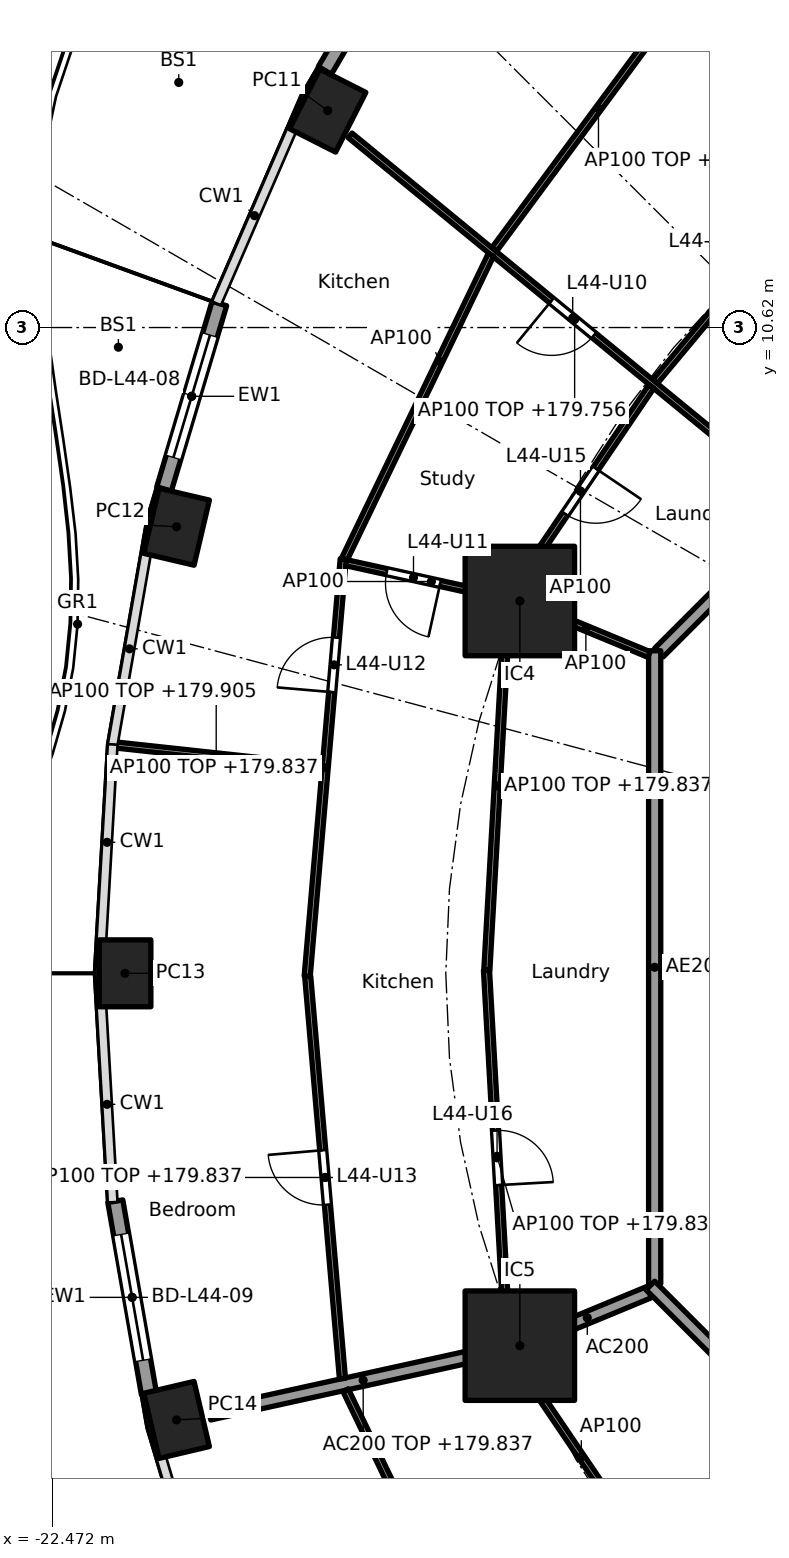
"""IFC4 building model, lengths in metres.
Left out: names, types, materials, properties, quantities, classifications, styles, units other than length and angle.
Written with IfcOpenShell. Run it as: python <this file> out.ifc"""

import sys

from ifc_helpers import new_model, si_unit, direction, frame, frame_2d, origin, origin_2d, place, context, subcontext, project, spatial, rectangle, hollow_rectangle, extrude, element, fill, save


model = new_model("IFC4")
c1 = context("Model", 3, precision=1e-05, world=origin(), true_north=direction((0.0, 1.0)))
c2 = subcontext(c1, "Body", "Model", "MODEL_VIEW")
j1 = project(units=[si_unit("LENGTHUNIT", "METRE"), si_unit("PLANEANGLEUNIT", "RADIAN")], contexts=[c1])
p1 = place(None, origin())
s1 = spatial("IfcSite", under=j1, at=p1, CompositionType="ELEMENT")
p2 = place(p1, origin())
s2 = spatial("IfcBuilding", under=s1, at=p2, CompositionType="ELEMENT")
p3 = place(p2, frame((0.0, 0.0, 177.0)))
s3 = spatial("IfcBuildingStorey", under=s2, at=p3, CompositionType="ELEMENT", Elevation=177.0)
for number, where, z_axis, x_axis in (
    (1, (-17.942, 14.188, 0.0), (0.0, 0.0, 1.0), (-0.452, -0.892, 0.0)),
    (2, (-20.427, 7.344, 0.0), (0.0, 0.0, 1.0), (-0.229, -0.973, 0.0)),
    (3, (-21.275, 0.0, 0.0), (0.0, 0.0, 1.0), (0.0, -1.0, 0.0)),
    (4, (-20.427, -7.344, 0.0), (0.0, 0.0, 1.0), (0.229, -0.973, 0.0)),
):
    element("IfcColumn", number, at=place(p3, frame(where, z_axis=z_axis, x_axis=x_axis)), inside=s3, PredefinedType="COLUMN", context=c2, shape_type="SweptSolid", body=[
        extrude(hollow_rectangle(XDim=1.1, YDim=0.85, WallThickness=0.036, at=origin_2d()), origin(), (0.0, 0.0, 1.0), 3.7),
    ])
for number, where, z_axis, x_axis in (
    (5, (-14.782, 6.123, 0.0), (0.0, 0.0, 1.0), (1.0, 0.0, 0.0)),
    (6, (-14.782, -6.123, 0.0), (0.0, 0.0, 1.0), (1.0, 0.0, 0.0)),
):
    element("IfcColumn", number, at=place(p3, frame(where, z_axis=z_axis, x_axis=x_axis)), inside=s3, PredefinedType="COLUMN", context=c2, shape_type="SweptSolid", body=[
        extrude(rectangle(XDim=1.8, YDim=1.8, at=origin_2d()), origin(), (0.0, 0.0, 1.0), 3.7),
    ])
p4 = place(p3, frame((-17.989, 14.848, 0.0), z_axis=(0.0, 0.0, 1.0), x_axis=(0.506309086483, 0.862352079458, 0.0)))
e7 = element("IfcWall", 7, at=p4, inside=s3, PredefinedType="SOLIDWALL", context=c2, shape_type="SweptSolid", body=[
    extrude(rectangle(XDim=3.092, YDim=0.25, at=frame_2d((1.546, 0.0))), origin(), (0.0, 0.0, 1.0), 3.44),
])
p5 = place(p4, frame((0.496, 0.0, 0.0)))
e8 = element("IfcOpeningElement", 8, at=p5, cuts=e7, PredefinedType="OPENING", context=c2, shape_type="SweptSolid", body=[
    extrude(rectangle(XDim=2.1, YDim=2.4, at=frame_2d((1.05, 1.2))), frame((0.0, 0.135, 0.0), z_axis=(0.0, -1.0, 0.0), x_axis=(1.0, 0.0, 0.0)), (0.0, 0.0, 1.0), 0.27),
])
p6 = place(p3, frame((-20.633, 7.965, 0.0), z_axis=(0.0, 0.0, 1.0), x_axis=(0.28584838049, 0.958274857946, 0.0)))
e9 = element("IfcWall", 9, at=p6, inside=s3, PredefinedType="SOLIDWALL", context=c2, shape_type="SweptSolid", body=[
    extrude(rectangle(XDim=3.182, YDim=0.25, at=frame_2d((1.591, 0.0))), origin(), (0.0, 0.0, 1.0), 3.44),
])
p7 = place(p6, frame((0.541, 0.0, 0.0)))
e10 = element("IfcOpeningElement", 10, at=p7, cuts=e9, PredefinedType="OPENING", context=c2, shape_type="SweptSolid", body=[
    extrude(rectangle(XDim=2.1, YDim=2.4, at=frame_2d((1.05, 1.2))), frame((0.0, 0.135, 0.0), z_axis=(0.0, -1.0, 0.0), x_axis=(1.0, 0.0, 0.0)), (0.0, 0.0, 1.0), 0.27),
])
p8 = place(p3, frame((-20.882, -6.91, 0.0), z_axis=(0.0, 0.0, 1.0), x_axis=(-0.172223552479, 0.98505789067, 0.0)))
e11 = element("IfcWall", 11, at=p8, inside=s3, PredefinedType="SOLIDWALL", context=c2, shape_type="SweptSolid", body=[
    extrude(rectangle(XDim=3.211, YDim=0.25, at=frame_2d((1.605, 0.0))), origin(), (0.0, 0.0, 1.0), 3.44),
])
p9 = place(p8, frame((0.555, 0.0, 0.0)))
e12 = element("IfcOpeningElement", 12, at=p9, cuts=e11, PredefinedType="OPENING", context=c2, shape_type="SweptSolid", body=[
    extrude(rectangle(XDim=2.1, YDim=2.4, at=frame_2d((1.05, 1.2))), frame((0.0, 0.135, 0.0), z_axis=(0.0, -1.0, 0.0), x_axis=(1.0, 0.0, 0.0)), (0.0, 0.0, 1.0), 0.27),
])
p10 = place(p3, frame((-12.657, -5.243, 0.0), z_axis=(0.0, 0.0, 1.0), x_axis=(-0.923859888513, -0.38273085373, 0.0)))
e13 = element("IfcWall", 13, at=p10, inside=s3, PredefinedType="PARTITIONING", context=c2, shape_type="SweptSolid", body=[
    extrude(rectangle(XDim=2.199, YDim=0.2, at=frame_2d((1.1, 0.0))), origin(), (0.0, 0.0, 1.0), 3.44),
])
p11 = place(p3, frame((-14.831, -6.134, 0.0), z_axis=(0.0, 0.0, 1.0), x_axis=(-0.976568396888, -0.215207263354, 0.0)))
e14 = element("IfcWall", 14, at=p11, inside=s3, PredefinedType="PARTITIONING", context=c2, shape_type="SweptSolid", body=[
    extrude(rectangle(XDim=5.177, YDim=0.2, at=frame_2d((2.588, 0.0))), origin(), (0.0, 0.0, 1.0), 2.837),
])
p12 = place(p3, frame((-5.275, 12.494, 0.0), z_axis=(0.0, 0.0, 1.0), x_axis=(-0.707106781187, -0.707106781187, 0.0)))
e15 = element("IfcWall", 15, at=p12, inside=s3, PredefinedType="PARTITIONING", context=c2, shape_type="SweptSolid", body=[
    extrude(rectangle(XDim=10.209, YDim=0.2, at=frame_2d((5.104, 0.0))), origin(), (0.0, 0.0, 1.0), 3.44),
])
p13 = place(p3, frame((-12.565, 5.304, 0.0), z_axis=(0.0, 0.0, 1.0), x_axis=(0.0, -1.0, 0.0)))
e16 = element("IfcWall", 16, at=p13, inside=s3, PredefinedType="PARTITIONING", context=c2, shape_type="SweptSolid", body=[
    extrude(rectangle(XDim=10.409, YDim=0.2, at=frame_2d((5.205, 0.0))), origin(), (0.0, 0.0, 1.0), 3.44),
])
p14 = place(p3, frame((-12.635, -5.134, 0.0), z_axis=(0.0, 0.0, 1.0), x_axis=(0.707106781187, -0.707106781187, 0.0)))
e17 = element("IfcWall", 17, at=p14, inside=s3, PredefinedType="PARTITIONING", context=c2, shape_type="SweptSolid", body=[
    extrude(rectangle(XDim=10.609, YDim=0.2, at=frame_2d((5.305, 0.0))), origin(), (0.0, 0.0, 1.0), 3.44),
])
p15 = place(p3, frame((-9.631, 13.242, 0.0), z_axis=(0.0, 0.0, 1.0), x_axis=(-0.640315711982, -0.768111833647, 0.0)))
e18 = element("IfcWall", 18, at=p15, inside=s3, PredefinedType="PARTITIONING", context=c2, shape_type="SweptSolid", body=[
    extrude(rectangle(XDim=4.572, YDim=0.1, at=frame_2d((2.286, 0.0))), origin(), (0.0, 0.0, 1.0), 2.837),
])
p16 = place(p15, frame((1.861, 0.0, 0.0)))
e19 = element("IfcOpeningElement", 19, at=p16, cuts=e18, PredefinedType="OPENING", context=c2, shape_type="SweptSolid", body=[
    extrude(rectangle(XDim=0.9, YDim=2.1, at=frame_2d((0.45, 1.05))), frame((0.0, 0.06, 0.0), z_axis=(0.0, -1.0, 0.0), x_axis=(1.0, 0.0, 0.0)), (0.0, 0.0, 1.0), 0.12),
])
p17 = place(p3, frame((-11.773, 16.542, 0.0), z_axis=(0.0, 0.0, 1.0), x_axis=(-0.594694305999, -0.803951915485, 0.0)))
e20 = element("IfcWall", 20, at=p17, inside=s3, PredefinedType="PARTITIONING", context=c2, shape_type="SweptSolid", body=[
    extrude(rectangle(XDim=5.772, YDim=0.1, at=frame_2d((2.886, 0.0))), origin(), (0.0, 0.0, 1.0), 2.837),
])
p18 = place(p3, frame((-10.189, 7.721, 0.0), z_axis=(0.0, 0.0, 1.0), x_axis=(-0.773134429339, 0.634242188892, 0.0)))
e21 = element("IfcWall", 21, at=p18, inside=s3, PredefinedType="PARTITIONING", context=c2, shape_type="SweptSolid", body=[
    extrude(rectangle(XDim=9.552, YDim=0.1, at=frame_2d((4.776, 0.0))), origin(), (0.0, 0.0, 1.0), 2.756),
])
p19 = place(p18, frame((4.367, 0.0, 0.0)))
e22 = element("IfcOpeningElement", 22, at=p19, cuts=e21, PredefinedType="OPENING", context=c2, shape_type="SweptSolid", body=[
    extrude(rectangle(XDim=0.9, YDim=2.1, at=frame_2d((0.45, 1.05))), frame((0.0, 0.06, 0.0), z_axis=(0.0, -1.0, 0.0), x_axis=(1.0, 0.0, 0.0)), (0.0, 0.0, 1.0), 0.12),
])
p20 = place(p3, frame((-12.619, 9.65, 0.0), z_axis=(0.0, 0.0, 1.0), x_axis=(-0.561064907171, -0.827771810308, 0.0)))
e23 = element("IfcWall", 23, at=p20, inside=s3, PredefinedType="PARTITIONING", context=c2, shape_type="SweptSolid", body=[
    extrude(rectangle(XDim=4.159, YDim=0.1, at=frame_2d((2.079, 0.0))), origin(), (0.0, 0.0, 1.0), 3.44),
])
p21 = place(p20, frame((1.629, 0.0, 0.0)))
e24 = element("IfcOpeningElement", 24, at=p21, cuts=e23, PredefinedType="OPENING", context=c2, shape_type="SweptSolid", body=[
    extrude(rectangle(XDim=0.9, YDim=2.1, at=frame_2d((0.45, 1.05))), frame((0.0, 0.06, 0.0), z_axis=(0.0, -1.0, 0.0), x_axis=(1.0, 0.0, 0.0)), (0.0, 0.0, 1.0), 0.12),
])
p22 = place(p3, frame((-15.257, 11.816, 0.0), z_axis=(0.0, 0.0, 1.0), x_axis=(-0.434040130629, -0.900893536997, 0.0)))
e25 = element("IfcWall", 25, at=p22, inside=s3, PredefinedType="PARTITIONING", context=c2, shape_type="SweptSolid", body=[
    extrude(rectangle(XDim=5.558, YDim=0.1, at=frame_2d((2.779, 0.0))), origin(), (0.0, 0.0, 1.0), 3.44),
])
p23 = place(p3, frame((-12.657, 5.243, 0.0), z_axis=(0.0, 0.0, 1.0), x_axis=(-0.923848837015, 0.382757529444, 0.0)))
e26 = element("IfcWall", 26, at=p23, inside=s3, PredefinedType="PARTITIONING", context=c2, shape_type="SweptSolid", body=[
    extrude(rectangle(XDim=2.25, YDim=0.1, at=frame_2d((1.125, 0.0))), origin(), (0.0, 0.0, 1.0), 3.44),
])
p24 = place(p3, frame((-14.831, 6.134, 0.0), z_axis=(0.0, 0.0, 1.0), x_axis=(-0.976560749847, 0.215241961191, 0.0)))
e27 = element("IfcWall", 27, at=p24, inside=s3, PredefinedType="PARTITIONING", context=c2, shape_type="SweptSolid", body=[
    extrude(rectangle(XDim=2.879, YDim=0.1, at=frame_2d((1.439, 0.0))), origin(), (0.0, 0.0, 1.0), 3.44),
])
p25 = place(p24, frame((1.291, 0.0, 0.0)))
e28 = element("IfcOpeningElement", 28, at=p25, cuts=e27, PredefinedType="OPENING", context=c2, shape_type="SweptSolid", body=[
    extrude(rectangle(XDim=0.9, YDim=2.1, at=frame_2d((0.45, 1.05))), frame((0.0, 0.06, 0.0), z_axis=(0.0, -1.0, 0.0), x_axis=(1.0, 0.0, 0.0)), (0.0, 0.0, 1.0), 0.12),
])
p26 = place(p3, frame((-14.983, 6.117, 0.0), z_axis=(0.0, 0.0, 1.0), x_axis=(-0.056328933432, -0.998412265178, 0.0)))
e29 = element("IfcWall", 29, at=p26, inside=s3, PredefinedType="PARTITIONING", context=c2, shape_type="SweptSolid", body=[
    extrude(rectangle(XDim=6.077, YDim=0.1, at=frame_2d((3.038, 0.0))), origin(), (0.0, 0.0, 1.0), 2.837),
])
p27 = place(p3, frame((-17.687, 6.814, 0.0), z_axis=(0.0, 0.0, 1.0), x_axis=(-0.086010249709, -0.996294252189, 0.0)))
e30 = element("IfcWall", 30, at=p27, inside=s3, PredefinedType="PARTITIONING", context=c2, shape_type="SweptSolid", body=[
    extrude(rectangle(XDim=6.889, YDim=0.1, at=frame_2d((3.445, 0.0))), origin(), (0.0, 0.0, 1.0), 2.837),
])
p28 = place(p27, frame((1.297, 0.0, 0.0)))
e31 = element("IfcOpeningElement", 31, at=p28, cuts=e30, PredefinedType="OPENING", context=c2, shape_type="SweptSolid", body=[
    extrude(rectangle(XDim=0.9, YDim=2.1, at=frame_2d((0.45, 1.05))), frame((0.0, 0.06, 0.0), z_axis=(0.0, -1.0, 0.0), x_axis=(1.0, 0.0, 0.0)), (0.0, 0.0, 1.0), 0.12),
])
p29 = place(p3, frame((-18.033, 3.387, 0.0), z_axis=(0.0, 0.0, 1.0), x_axis=(-0.994194772207, 0.107595329438, 0.0)))
e32 = element("IfcWall", 32, at=p29, inside=s3, PredefinedType="PARTITIONING", context=c2, shape_type="SweptSolid", body=[
    extrude(rectangle(XDim=3.506, YDim=0.1, at=frame_2d((1.753, 0.0))), origin(), (0.0, 0.0, 1.0), 2.905),
])
p30 = place(p3, frame((-15.331, 0.05, 0.0), z_axis=(0.0, 0.0, 1.0), x_axis=(0.056310939406, -0.998413280212, 0.0)))
e33 = element("IfcWall", 33, at=p30, inside=s3, PredefinedType="PARTITIONING", context=c2, shape_type="SweptSolid", body=[
    extrude(rectangle(XDim=6.126, YDim=0.1, at=frame_2d((3.063, 0.0))), origin(), (0.0, 0.0, 1.0), 2.837),
])
p31 = place(p30, frame((2.638, 0.0, 0.0)))
e34 = element("IfcOpeningElement", 34, at=p31, cuts=e33, PredefinedType="OPENING", context=c2, shape_type="SweptSolid", body=[
    extrude(rectangle(XDim=0.9, YDim=2.1, at=frame_2d((0.45, 1.05))), frame((0.0, 0.06, 0.0), z_axis=(0.0, -1.0, 0.0), x_axis=(1.0, 0.0, 0.0)), (0.0, 0.0, 1.0), 0.12),
])
p32 = place(p3, frame((-18.271, -0.05, 0.0), z_axis=(0.0, 0.0, 1.0), x_axis=(0.086012321907, -0.996294073294, 0.0)))
e35 = element("IfcWall", 35, at=p32, inside=s3, PredefinedType="PARTITIONING", context=c2, shape_type="SweptSolid", body=[
    extrude(rectangle(XDim=6.639, YDim=0.1, at=frame_2d((3.32, 0.0))), origin(), (0.0, 0.0, 1.0), 2.837),
])
p33 = place(p32, frame((2.87, 0.0, 0.0)))
e36 = element("IfcOpeningElement", 36, at=p33, cuts=e35, PredefinedType="OPENING", context=c2, shape_type="SweptSolid", body=[
    extrude(rectangle(XDim=0.9, YDim=2.1, at=frame_2d((0.45, 1.05))), frame((0.0, 0.06, 0.0), z_axis=(0.0, -1.0, 0.0), x_axis=(1.0, 0.0, 0.0)), (0.0, 0.0, 1.0), 0.12),
])
p34 = place(p3, frame((-14.924, -6.249, 0.0), z_axis=(0.0, 0.0, 1.0), x_axis=(0.561046521684, -0.82778427172, 0.0)))
e37 = element("IfcWall", 37, at=p34, inside=s3, PredefinedType="PARTITIONING", context=c2, shape_type="SweptSolid", body=[
    extrude(rectangle(XDim=4.109, YDim=0.1, at=frame_2d((2.054, 0.0))), origin(), (0.0, 0.0, 1.0), 3.44),
])
p35 = place(p3, frame((-17.647, -6.854, 0.0), z_axis=(0.0, 0.0, 1.0), x_axis=(0.434027506504, -0.900899619046, 0.0)))
e38 = element("IfcWall", 38, at=p35, inside=s3, PredefinedType="PARTITIONING", context=c2, shape_type="SweptSolid", body=[
    extrude(rectangle(XDim=5.508, YDim=0.1, at=frame_2d((2.754, 0.0))), origin(), (0.0, 0.0, 1.0), 3.44),
])
p36 = place(p35, frame((2.304, 0.0, 0.0)))
e39 = element("IfcOpeningElement", 39, at=p36, cuts=e38, PredefinedType="OPENING", context=c2, shape_type="SweptSolid", body=[
    extrude(rectangle(XDim=0.9, YDim=2.1, at=frame_2d((0.45, 1.05))), frame((0.0, 0.06, 0.0), z_axis=(0.0, -1.0, 0.0), x_axis=(1.0, 0.0, 0.0)), (0.0, 0.0, 1.0), 0.12),
])
p37 = place(p7, origin())
e40 = element("IfcDoor", 40, at=p37, inside=s3, OperationType="SLIDING_TO_LEFT", PredefinedType="DOOR", context=c2, shape_type="SweptSolid", body=[
    extrude(rectangle(XDim=2.1, YDim=2.4, at=frame_2d((1.05, 1.2))), frame((0.0, 0.025, 0.0), z_axis=(0.0, -1.0, 0.0), x_axis=(1.0, 0.0, 0.0)), (0.0, 0.0, 1.0), 0.05),
])
fill(e10, e40)
p38 = place(p9, origin())
e41 = element("IfcDoor", 41, at=p38, inside=s3, OperationType="SLIDING_TO_LEFT", PredefinedType="DOOR", context=c2, shape_type="SweptSolid", body=[
    extrude(rectangle(XDim=2.1, YDim=2.4, at=frame_2d((1.05, 1.2))), frame((0.0, 0.025, 0.0), z_axis=(0.0, -1.0, 0.0), x_axis=(1.0, 0.0, 0.0)), (0.0, 0.0, 1.0), 0.05),
])
fill(e12, e41)
p39 = place(p19, origin())
e42 = element("IfcDoor", 42, at=p39, inside=s3, OperationType="SINGLE_SWING_RIGHT", PredefinedType="DOOR", context=c2, shape_type="SweptSolid", body=[
    extrude(rectangle(XDim=0.9, YDim=2.1, at=frame_2d((0.45, 1.05))), frame((0.0, 0.025, 0.0), z_axis=(0.0, -1.0, 0.0), x_axis=(1.0, 0.0, 0.0)), (0.0, 0.0, 1.0), 0.05),
])
fill(e22, e42)
p40 = place(p25, origin())
e43 = element("IfcDoor", 43, at=p40, inside=s3, OperationType="SINGLE_SWING_LEFT", PredefinedType="DOOR", context=c2, shape_type="SweptSolid", body=[
    extrude(rectangle(XDim=0.9, YDim=2.1, at=frame_2d((0.45, 1.05))), frame((0.0, 0.025, 0.0), z_axis=(0.0, -1.0, 0.0), x_axis=(1.0, 0.0, 0.0)), (0.0, 0.0, 1.0), 0.05),
])
fill(e28, e43)
p41 = place(p28, frame((0.9, 0.0, 0.0), x_axis=(-1.0, 0.0, 0.0)))
e44 = element("IfcDoor", 44, at=p41, inside=s3, OperationType="SINGLE_SWING_LEFT", PredefinedType="DOOR", context=c2, shape_type="SweptSolid", body=[
    extrude(rectangle(XDim=0.9, YDim=2.1, at=frame_2d((0.45, 1.05))), frame((0.0, 0.025, 0.0), z_axis=(0.0, -1.0, 0.0), x_axis=(1.0, 0.0, 0.0)), (0.0, 0.0, 1.0), 0.05),
])
fill(e31, e44)
p42 = place(p33, frame((0.9, 0.0, 0.0), x_axis=(-1.0, 0.0, 0.0)))
e45 = element("IfcDoor", 45, at=p42, inside=s3, OperationType="SINGLE_SWING_RIGHT", PredefinedType="DOOR", context=c2, shape_type="SweptSolid", body=[
    extrude(rectangle(XDim=0.9, YDim=2.1, at=frame_2d((0.45, 1.05))), frame((0.0, 0.025, 0.0), z_axis=(0.0, -1.0, 0.0), x_axis=(1.0, 0.0, 0.0)), (0.0, 0.0, 1.0), 0.05),
])
fill(e36, e45)
p43 = place(p21, origin())
e46 = element("IfcDoor", 46, at=p43, inside=s3, OperationType="SINGLE_SWING_LEFT", PredefinedType="DOOR", context=c2, shape_type="SweptSolid", body=[
    extrude(rectangle(XDim=0.9, YDim=2.1, at=frame_2d((0.45, 1.05))), frame((0.0, 0.025, 0.0), z_axis=(0.0, -1.0, 0.0), x_axis=(1.0, 0.0, 0.0)), (0.0, 0.0, 1.0), 0.05),
])
fill(e24, e46)
p44 = place(p31, origin())
e47 = element("IfcDoor", 47, at=p44, inside=s3, OperationType="SINGLE_SWING_RIGHT", PredefinedType="DOOR", context=c2, shape_type="SweptSolid", body=[
    extrude(rectangle(XDim=0.9, YDim=2.1, at=frame_2d((0.45, 1.05))), frame((0.0, 0.025, 0.0), z_axis=(0.0, -1.0, 0.0), x_axis=(1.0, 0.0, 0.0)), (0.0, 0.0, 1.0), 0.05),
])
fill(e34, e47)
save(model, sys.argv[1])
